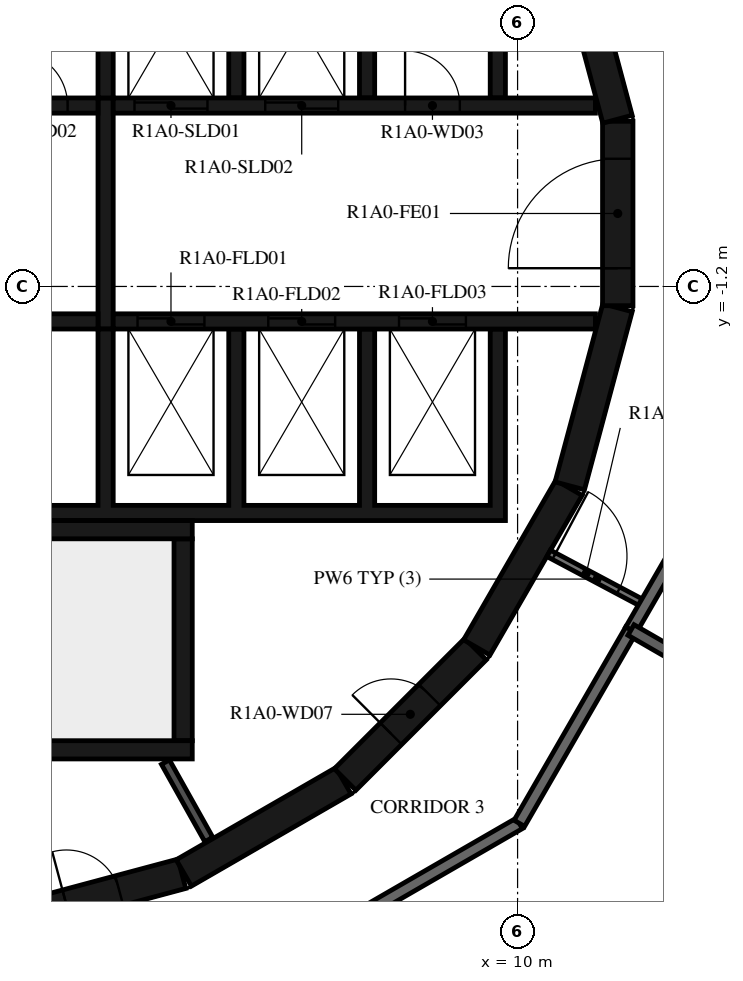
"""IFC4 building model, lengths in metres.
Left out: names, types, materials, properties, quantities, classifications, styles, units other than length and angle.
Written with IfcOpenShell. Run it as: python <this file> out.ifc"""

import sys

from ifc_helpers import new_model, si_unit, direction, frame, frame_2d, origin, place, context, subcontext, project, spatial, polyline, rectangle, outline, extrude, element, fill, save


model = new_model("IFC4")
c1 = context("Model", 3, precision=1e-05, world=origin(), true_north=direction((0.0, 1.0)))
c2 = subcontext(c1, "Body", "Model", "MODEL_VIEW")
j1 = project(units=[si_unit("LENGTHUNIT", "METRE"), si_unit("PLANEANGLEUNIT", "RADIAN")], contexts=[c1])
p1 = place(None, origin())
s1 = spatial("IfcSite", under=j1, at=p1, CompositionType="ELEMENT")
p2 = place(p1, origin())
s2 = spatial("IfcBuilding", under=s1, at=p2, CompositionType="ELEMENT")
p3 = place(p2, frame((0.0, 0.0, 38.4)))
s3 = spatial("IfcBuildingStorey", under=s2, at=p3, CompositionType="ELEMENT", Elevation=38.4)
p4 = place(p3, frame((1.55, -11.643, 0.0), z_axis=(0.0, 0.0, 1.0), x_axis=(0.965948410781, 0.258734743916, 0.0)))
e1 = element("IfcWall", 1, at=p4, inside=s3, PredefinedType="SHEAR", context=c2, shape_type="SweptSolid", body=[
    extrude(rectangle(XDim=3.033, YDim=0.5, at=frame_2d((1.516, 0.0))), origin(), (0.0, 0.0, 1.0), 3.12),
])
p5 = place(p4, frame((1.066, 0.0, 0.0)))
e2 = element("IfcOpeningElement", 2, at=p5, cuts=e1, PredefinedType="OPENING", context=c2, shape_type="SweptSolid", body=[
    extrude(rectangle(XDim=0.9, YDim=2.1, at=frame_2d((0.45, 1.05))), frame((0.0, 0.26, 0.0), z_axis=(0.0, -1.0, 0.0), x_axis=(1.0, 0.0, 0.0)), (0.0, 0.0, 1.0), 0.52),
])
p6 = place(p3, frame((4.51, -10.845, 0.0), z_axis=(0.0, 0.0, 1.0), x_axis=(0.865975092491, 0.500087131594, 0.0)))
e3 = element("IfcWall", 3, at=p6, inside=s3, PredefinedType="SHEAR", context=c2, shape_type="SweptSolid", body=[
    extrude(rectangle(XDim=3.033, YDim=0.5, at=frame_2d((1.516, 0.0))), origin(), (0.0, 0.0, 1.0), 3.12),
])
p7 = place(p3, frame((7.164, -9.308, 0.0), z_axis=(0.0, 0.0, 1.0), x_axis=(0.707106781187, 0.707106781187, 0.0)))
e4 = element("IfcWall", 4, at=p7, inside=s3, PredefinedType="SHEAR", context=c2, shape_type="SweptSolid", body=[
    extrude(rectangle(XDim=3.032, YDim=0.5, at=frame_2d((1.516, 0.0))), origin(), (0.0, 0.0, 1.0), 3.12),
])
p8 = place(p7, frame((1.066, 0.0, 0.0)))
e5 = element("IfcOpeningElement", 5, at=p8, cuts=e4, PredefinedType="OPENING", context=c2, shape_type="SweptSolid", body=[
    extrude(rectangle(XDim=0.9, YDim=2.1, at=frame_2d((0.45, 1.05))), frame((0.0, 0.26, 0.0), z_axis=(0.0, -1.0, 0.0), x_axis=(1.0, 0.0, 0.0)), (0.0, 0.0, 1.0), 0.52),
])
for number, where, z_axis, x_axis in (
    (6, (9.329, -7.137, 0.0), (0.0, 0.0, 1.0), (0.5, 0.866, 0.0)),
    (7, (10.858, -4.479, 0.0), (0.0, 0.0, 1.0), (0.259, 0.966, 0.0)),
):
    element("IfcWall", number, at=place(p3, frame(where, z_axis=z_axis, x_axis=x_axis)), inside=s3, PredefinedType="SHEAR", context=c2, shape_type="SweptSolid", body=[
        extrude(rectangle(XDim=3.033, YDim=0.5, at=frame_2d((1.516, 0.0))), origin(), (0.0, 0.0, 1.0), 3.12),
    ])
p9 = place(p3, frame((11.647, -1.516, 0.0), z_axis=(0.0, 0.0, 1.0), x_axis=(0.0, 1.0, 0.0)))
e8 = element("IfcWall", 8, at=p9, inside=s3, PredefinedType="SHEAR", context=c2, shape_type="SweptSolid", body=[
    extrude(rectangle(XDim=3.033, YDim=0.5, at=frame_2d((1.516, 0.0))), origin(), (0.0, 0.0, 1.0), 3.12),
])
p10 = place(p9, frame((0.616, 0.0, 0.0)))
e9 = element("IfcOpeningElement", 9, at=p10, cuts=e8, PredefinedType="OPENING", context=c2, shape_type="SweptSolid", body=[
    extrude(rectangle(XDim=1.8, YDim=2.1, at=frame_2d((0.9, 1.05))), frame((0.0, 0.26, 0.0), z_axis=(0.0, -1.0, 0.0), x_axis=(1.0, 0.0, 0.0)), (0.0, 0.0, 1.0), 0.52),
])
p11 = place(p3, frame((11.643, 1.55, 0.0), z_axis=(0.0, 0.0, 1.0), x_axis=(-0.258734743916, 0.965948410781, 0.0)))
e10 = element("IfcWall", 10, at=p11, inside=s3, PredefinedType="SHEAR", context=c2, shape_type="SweptSolid", body=[
    extrude(rectangle(XDim=3.033, YDim=0.5, at=frame_2d((1.516, 0.0))), origin(), (0.0, 0.0, 1.0), 3.12),
])
p12 = place(p3, frame((-2.4, -5.2, 0.0), z_axis=(0.0, 0.0, 1.0), x_axis=(1.0, 0.0, 0.0)))
e11 = element("IfcWall", 11, at=p12, inside=s3, PredefinedType="SHEAR", context=c2, shape_type="SweptSolid", body=[
    extrude(rectangle(XDim=7.05, YDim=0.3, at=frame_2d((3.525, 0.0))), origin(), (0.0, 0.0, 1.0), 3.12),
])
p13 = place(p3, frame((4.5, -8.67, 0.0), z_axis=(0.0, 0.0, 1.0), x_axis=(0.0, 1.0, 0.0)))
e12 = element("IfcWall", 12, at=p13, inside=s3, PredefinedType="SHEAR", context=c2, shape_type="SweptSolid", body=[
    extrude(rectangle(XDim=3.32, YDim=0.3, at=frame_2d((1.66, 0.0))), origin(), (0.0, 0.0, 1.0), 3.12),
])
p14 = place(p3, frame((0.1, -8.82, 0.0), z_axis=(0.0, 0.0, 1.0), x_axis=(1.0, 0.0, 0.0)))
e13 = element("IfcWall", 13, at=p14, inside=s3, PredefinedType="SHEAR", context=c2, shape_type="SweptSolid", body=[
    extrude(rectangle(XDim=4.55, YDim=0.3, at=frame_2d((2.275, 0.0))), origin(), (0.0, 0.0, 1.0), 3.12),
])
p15 = place(p3, origin())
e14 = element("IfcWall", 14, at=p15, inside=s3, PredefinedType="SHEAR", context=c2, shape_type="SweptSolid", body=[
    extrude(outline(polyline([(-9.55, 4.8), (-7.65, 4.8), (-7.65, 1.9), (-7.4, 1.9), (-7.4, 4.8), (-5.5, 4.8), (-5.5, 1.9), (-5.25, 1.9), (-5.25, 4.8), (-3.35, 4.8), (-3.35, 1.9), (-3.1, 1.9), (-3.1, 4.8), (-1.2, 4.8), (-1.2, 1.9), (-0.95, 1.9), (-0.95, 4.8), (0.95, 4.8), (0.95, 1.9), (1.2, 1.9), (1.2, 4.8), (3.1, 4.8), (3.1, 1.9), (3.35, 1.9), (3.35, 4.8), (5.25, 4.8), (5.25, 1.9), (5.5, 1.9), (5.5, 4.8), (7.4, 4.8), (7.4, 1.9), (7.65, 1.9), (7.65, 4.8), (9.55, 4.8), (9.55, 1.9), (9.8, 1.9), (9.8, 4.8), (9.8, 5.05), (-9.8, 5.05), (-9.8, 4.8), (-9.8, 1.9), (-9.55, 1.9), (-9.55, 4.8)])), origin(), (0.0, 0.0, 1.0), 3.12),
])
p16 = place(p3, origin())
e15 = element("IfcWall", 15, at=p16, inside=s3, PredefinedType="SHEAR", context=c2, shape_type="SweptSolid", body=[
    extrude(outline(polyline([(9.8, -5.05), (9.8, -4.8), (9.8, -1.9), (9.55, -1.9), (9.55, -4.8), (7.65, -4.8), (7.65, -1.9), (7.4, -1.9), (7.4, -4.8), (5.5, -4.8), (5.5, -1.9), (5.25, -1.9), (5.25, -4.8), (3.35, -4.8), (3.35, -1.9), (3.1, -1.9), (3.1, -4.8), (-5.25, -4.8), (-5.25, -1.9), (-5.5, -1.9), (-5.5, -4.8), (-7.4, -4.8), (-7.4, -1.9), (-7.65, -1.9), (-7.65, -4.8), (-9.55, -4.8), (-9.55, -1.9), (-9.8, -1.9), (-9.8, -4.8), (-9.8, -5.05), (9.8, -5.05)])), origin(), (0.0, 0.0, 1.0), 3.12),
])
p17 = place(p3, frame((-11.28, 1.775, 0.0), z_axis=(0.0, 0.0, 1.0), x_axis=(1.0, 0.0, 0.0)))
e16 = element("IfcWall", 16, at=p17, inside=s3, PredefinedType="SHEAR", context=c2, shape_type="SweptSolid", body=[
    extrude(rectangle(XDim=14.38, YDim=0.25, at=frame_2d((7.19, 0.0))), origin(), (0.0, 0.0, 1.0), 3.12),
])
p18 = place(p17, frame((2.13, 0.0, 0.0)))
e17 = element("IfcOpeningElement", 17, at=p18, cuts=e16, PredefinedType="OPENING", context=c2, shape_type="SweptSolid", body=[
    extrude(rectangle(XDim=1.1, YDim=2.1, at=frame_2d((0.55, 1.05))), frame((0.0, 0.135, 0.0), z_axis=(0.0, -1.0, 0.0), x_axis=(1.0, 0.0, 0.0)), (0.0, 0.0, 1.0), 0.27),
])
p19 = place(p17, frame((4.28, 0.0, 0.0)))
e18 = element("IfcOpeningElement", 18, at=p19, cuts=e16, PredefinedType="OPENING", context=c2, shape_type="SweptSolid", body=[
    extrude(rectangle(XDim=1.1, YDim=2.1, at=frame_2d((0.55, 1.05))), frame((0.0, 0.135, 0.0), z_axis=(0.0, -1.0, 0.0), x_axis=(1.0, 0.0, 0.0)), (0.0, 0.0, 1.0), 0.27),
])
p20 = place(p17, frame((6.43, 0.0, 0.0)))
e19 = element("IfcOpeningElement", 19, at=p20, cuts=e16, PredefinedType="OPENING", context=c2, shape_type="SweptSolid", body=[
    extrude(rectangle(XDim=1.1, YDim=2.1, at=frame_2d((0.55, 1.05))), frame((0.0, 0.135, 0.0), z_axis=(0.0, -1.0, 0.0), x_axis=(1.0, 0.0, 0.0)), (0.0, 0.0, 1.0), 0.27),
])
p21 = place(p17, frame((8.58, 0.0, 0.0)))
e20 = element("IfcOpeningElement", 20, at=p21, cuts=e16, PredefinedType="OPENING", context=c2, shape_type="SweptSolid", body=[
    extrude(rectangle(XDim=1.1, YDim=2.1, at=frame_2d((0.55, 1.05))), frame((0.0, 0.135, 0.0), z_axis=(0.0, -1.0, 0.0), x_axis=(1.0, 0.0, 0.0)), (0.0, 0.0, 1.0), 0.27),
])
p22 = place(p17, frame((10.83, 0.0, 0.0)))
e21 = element("IfcOpeningElement", 21, at=p22, cuts=e16, PredefinedType="OPENING", context=c2, shape_type="SweptSolid", body=[
    extrude(rectangle(XDim=0.9, YDim=2.1, at=frame_2d((0.45, 1.05))), frame((0.0, 0.135, 0.0), z_axis=(0.0, -1.0, 0.0), x_axis=(1.0, 0.0, 0.0)), (0.0, 0.0, 1.0), 0.27),
])
p23 = place(p17, frame((12.98, 0.0, 0.0)))
e22 = element("IfcOpeningElement", 22, at=p23, cuts=e16, PredefinedType="OPENING", context=c2, shape_type="SweptSolid", body=[
    extrude(rectangle(XDim=0.9, YDim=2.1, at=frame_2d((0.45, 1.05))), frame((0.0, 0.135, 0.0), z_axis=(0.0, -1.0, 0.0), x_axis=(1.0, 0.0, 0.0)), (0.0, 0.0, 1.0), 0.27),
])
p24 = place(p3, frame((3.35, 1.775, 0.0), z_axis=(0.0, 0.0, 1.0), x_axis=(1.0, 0.0, 0.0)))
e23 = element("IfcWall", 23, at=p24, inside=s3, PredefinedType="SHEAR", context=c2, shape_type="SweptSolid", body=[
    extrude(rectangle(XDim=7.93, YDim=0.25, at=frame_2d((3.965, 0.0))), origin(), (0.0, 0.0, 1.0), 3.12),
])
p25 = place(p24, frame((0.35, 0.0, 0.0)))
e24 = element("IfcOpeningElement", 24, at=p25, cuts=e23, PredefinedType="OPENING", context=c2, shape_type="SweptSolid", body=[
    extrude(rectangle(XDim=1.2, YDim=2.4, at=frame_2d((0.6, 1.2))), frame((0.0, 0.135, 0.0), z_axis=(0.0, -1.0, 0.0), x_axis=(1.0, 0.0, 0.0)), (0.0, 0.0, 1.0), 0.27),
])
p26 = place(p24, frame((2.5, 0.0, 0.0)))
e25 = element("IfcOpeningElement", 25, at=p26, cuts=e23, PredefinedType="OPENING", context=c2, shape_type="SweptSolid", body=[
    extrude(rectangle(XDim=1.2, YDim=2.4, at=frame_2d((0.6, 1.2))), frame((0.0, 0.135, 0.0), z_axis=(0.0, -1.0, 0.0), x_axis=(1.0, 0.0, 0.0)), (0.0, 0.0, 1.0), 0.27),
])
p27 = place(p24, frame((4.8, 0.0, 0.0)))
e26 = element("IfcOpeningElement", 26, at=p27, cuts=e23, PredefinedType="OPENING", context=c2, shape_type="SweptSolid", body=[
    extrude(rectangle(XDim=0.9, YDim=2.1, at=frame_2d((0.45, 1.05))), frame((0.0, 0.135, 0.0), z_axis=(0.0, -1.0, 0.0), x_axis=(1.0, 0.0, 0.0)), (0.0, 0.0, 1.0), 0.27),
])
p28 = place(p3, frame((-11.28, -1.775, 0.0), z_axis=(0.0, 0.0, 1.0), x_axis=(1.0, 0.0, 0.0)))
e27 = element("IfcWall", 27, at=p28, inside=s3, PredefinedType="SHEAR", context=c2, shape_type="SweptSolid", body=[
    extrude(rectangle(XDim=14.38, YDim=0.25, at=frame_2d((7.19, 0.0))), origin(), (0.0, 0.0, 1.0), 3.12),
])
p29 = place(p28, frame((9.755, 0.0, 0.0)))
e28 = element("IfcOpeningElement", 28, at=p29, cuts=e27, PredefinedType="OPENING", context=c2, shape_type="SweptSolid", body=[
    extrude(rectangle(XDim=0.9, YDim=2.1, at=frame_2d((0.45, 1.05))), frame((0.0, 0.135, 0.0), z_axis=(0.0, -1.0, 0.0), x_axis=(1.0, 0.0, 0.0)), (0.0, 0.0, 1.0), 0.27),
])
p30 = place(p3, frame((3.35, -1.775, 0.0), z_axis=(0.0, 0.0, 1.0), x_axis=(1.0, 0.0, 0.0)))
e29 = element("IfcWall", 29, at=p30, inside=s3, PredefinedType="SHEAR", context=c2, shape_type="SweptSolid", body=[
    extrude(rectangle(XDim=7.93, YDim=0.25, at=frame_2d((3.965, 0.0))), origin(), (0.0, 0.0, 1.0), 3.12),
])
p31 = place(p30, frame((0.4, 0.0, 0.0)))
e30 = element("IfcOpeningElement", 30, at=p31, cuts=e29, PredefinedType="OPENING", context=c2, shape_type="SweptSolid", body=[
    extrude(rectangle(XDim=1.1, YDim=2.4, at=frame_2d((0.55, 1.2))), frame((0.0, 0.135, 0.0), z_axis=(0.0, -1.0, 0.0), x_axis=(1.0, 0.0, 0.0)), (0.0, 0.0, 1.0), 0.27),
])
p32 = place(p30, frame((2.55, 0.0, 0.0)))
e31 = element("IfcOpeningElement", 31, at=p32, cuts=e29, PredefinedType="OPENING", context=c2, shape_type="SweptSolid", body=[
    extrude(rectangle(XDim=1.1, YDim=2.4, at=frame_2d((0.55, 1.2))), frame((0.0, 0.135, 0.0), z_axis=(0.0, -1.0, 0.0), x_axis=(1.0, 0.0, 0.0)), (0.0, 0.0, 1.0), 0.27),
])
p33 = place(p30, frame((4.7, 0.0, 0.0)))
e32 = element("IfcOpeningElement", 32, at=p33, cuts=e29, PredefinedType="OPENING", context=c2, shape_type="SweptSolid", body=[
    extrude(rectangle(XDim=1.1, YDim=2.4, at=frame_2d((0.55, 1.2))), frame((0.0, 0.135, 0.0), z_axis=(0.0, -1.0, 0.0), x_axis=(1.0, 0.0, 0.0)), (0.0, 0.0, 1.0), 0.27),
])
p34 = place(p3, frame((3.225, -1.9, 0.0), z_axis=(0.0, 0.0, 1.0), x_axis=(0.0, 1.0, 0.0)))
e33 = element("IfcWall", 33, at=p34, inside=s3, PredefinedType="SHEAR", context=c2, shape_type="SweptSolid", body=[
    extrude(rectangle(XDim=3.8, YDim=0.25, at=frame_2d((1.9, 0.0))), origin(), (0.0, 0.0, 1.0), 3.12),
])
p35 = place(p3, frame((4.922, -10.296, 0.0), z_axis=(0.0, 0.0, 1.0), x_axis=(-0.48860846254, 0.872503163509, 0.0)))
e34 = element("IfcWall", 34, at=p35, inside=s3, PredefinedType="PARTITIONING", context=c2, shape_type="SweptSolid", body=[
    extrude(rectangle(XDim=1.459, YDim=0.15, at=frame_2d((0.73, 0.0))), origin(), (0.0, 0.0, 1.0), 3.12),
])
p36 = place(p3, frame((10.511, -5.589, 0.0), z_axis=(0.0, 0.0, 1.0), x_axis=(0.88294043061, -0.469485032769, 0.0)))
e35 = element("IfcWall", 35, at=p36, inside=s3, PredefinedType="PARTITIONING", context=c2, shape_type="SweptSolid", body=[
    extrude(rectangle(XDim=1.804, YDim=0.12, at=frame_2d((0.902, 0.0))), origin(), (0.0, 0.0, 1.0), 3.12),
])
p37 = place(p36, frame((0.1, 0.0, 0.0)))
e36 = element("IfcOpeningElement", 36, at=p37, cuts=e35, PredefinedType="OPENING", context=c2, shape_type="SweptSolid", body=[
    extrude(rectangle(XDim=1.2, YDim=2.1, at=frame_2d((0.6, 1.05))), frame((0.0, 0.07, 0.0), z_axis=(0.0, -1.0, 0.0), x_axis=(1.0, 0.0, 0.0)), (0.0, 0.0, 1.0), 0.14),
])
p38 = place(p3, frame((11.865, -6.849, 0.0), z_axis=(0.0, 0.0, 1.0), x_axis=(0.500002704028, 0.866023842607, 0.0)))
e37 = element("IfcWall", 37, at=p38, inside=s3, PredefinedType="STANDARD", context=c2, shape_type="SweptSolid", body=[
    extrude(rectangle(XDim=3.67, YDim=0.2, at=frame_2d((1.835, 0.0))), origin(), (0.0, 0.0, 1.0), 3.12),
])
p39 = place(p3, frame((3.671, -13.7, 0.0), z_axis=(0.0, 0.0, 1.0), x_axis=(0.866024439905, 0.500001669485, 0.0)))
e38 = element("IfcWall", 38, at=p39, inside=s3, PredefinedType="STANDARD", context=c2, shape_type="SweptSolid", body=[
    extrude(rectangle(XDim=7.342, YDim=0.2, at=frame_2d((3.671, 0.0))), origin(), (0.0, 0.0, 1.0), 3.12),
])
p40 = place(p3, frame((10.029, -10.029, 0.0), z_axis=(0.0, 0.0, 1.0), x_axis=(0.50001606911, 0.866016126081, 0.0)))
e39 = element("IfcWall", 39, at=p40, inside=s3, PredefinedType="STANDARD", context=c2, shape_type="SweptSolid", body=[
    extrude(rectangle(XDim=3.671, YDim=0.2, at=frame_2d((1.835, 0.0))), origin(), (0.0, 0.0, 1.0), 3.12),
])
p41 = place(p3, frame((18.694, -10.793, 0.0), z_axis=(0.0, 0.0, 1.0), x_axis=(-0.865964895271, 0.500104789178, 0.0)))
e40 = element("IfcWall", 40, at=p41, inside=s3, PredefinedType="STANDARD", context=c2, shape_type="SweptSolid", body=[
    extrude(rectangle(XDim=7.885, YDim=0.2, at=frame_2d((3.943, 0.0))), origin(), (0.0, 0.0, 1.0), 3.12),
])
p42 = place(p10, origin())
e41 = element("IfcDoor", 41, at=p42, inside=s3, OperationType="DOUBLE_DOOR_SINGLE_SWING", PredefinedType="DOOR", context=c2, shape_type="SweptSolid", body=[
    extrude(rectangle(XDim=1.8, YDim=2.1, at=frame_2d((0.9, 1.05))), frame((0.0, 0.025, 0.0), z_axis=(0.0, -1.0, 0.0), x_axis=(1.0, 0.0, 0.0)), (0.0, 0.0, 1.0), 0.05),
])
fill(e9, e41)
p43 = place(p25, origin())
e42 = element("IfcDoor", 42, at=p43, inside=s3, OperationType="DOUBLE_DOOR_SLIDING", PredefinedType="DOOR", context=c2, shape_type="SweptSolid", body=[
    extrude(rectangle(XDim=1.2, YDim=2.4, at=frame_2d((0.6, 1.2))), frame((0.0, 0.025, 0.0), z_axis=(0.0, -1.0, 0.0), x_axis=(1.0, 0.0, 0.0)), (0.0, 0.0, 1.0), 0.05),
])
fill(e24, e42)
p44 = place(p26, origin())
e43 = element("IfcDoor", 43, at=p44, inside=s3, OperationType="DOUBLE_DOOR_SLIDING", PredefinedType="DOOR", context=c2, shape_type="SweptSolid", body=[
    extrude(rectangle(XDim=1.2, YDim=2.4, at=frame_2d((0.6, 1.2))), frame((0.0, 0.025, 0.0), z_axis=(0.0, -1.0, 0.0), x_axis=(1.0, 0.0, 0.0)), (0.0, 0.0, 1.0), 0.05),
])
fill(e25, e43)
p45 = place(p31, origin())
e44 = element("IfcDoor", 44, at=p45, inside=s3, OperationType="DOUBLE_DOOR_SLIDING", PredefinedType="DOOR", context=c2, shape_type="SweptSolid", body=[
    extrude(rectangle(XDim=1.1, YDim=2.4, at=frame_2d((0.55, 1.2))), frame((0.0, 0.025, 0.0), z_axis=(0.0, -1.0, 0.0), x_axis=(1.0, 0.0, 0.0)), (0.0, 0.0, 1.0), 0.05),
])
fill(e30, e44)
p46 = place(p32, origin())
e45 = element("IfcDoor", 45, at=p46, inside=s3, OperationType="DOUBLE_DOOR_SLIDING", PredefinedType="DOOR", context=c2, shape_type="SweptSolid", body=[
    extrude(rectangle(XDim=1.1, YDim=2.4, at=frame_2d((0.55, 1.2))), frame((0.0, 0.025, 0.0), z_axis=(0.0, -1.0, 0.0), x_axis=(1.0, 0.0, 0.0)), (0.0, 0.0, 1.0), 0.05),
])
fill(e31, e45)
p47 = place(p33, origin())
e46 = element("IfcDoor", 46, at=p47, inside=s3, OperationType="DOUBLE_DOOR_SLIDING", PredefinedType="DOOR", context=c2, shape_type="SweptSolid", body=[
    extrude(rectangle(XDim=1.1, YDim=2.4, at=frame_2d((0.55, 1.2))), frame((0.0, 0.025, 0.0), z_axis=(0.0, -1.0, 0.0), x_axis=(1.0, 0.0, 0.0)), (0.0, 0.0, 1.0), 0.05),
])
fill(e32, e46)
p48 = place(p23, origin())
e47 = element("IfcDoor", 47, at=p48, inside=s3, OperationType="SINGLE_SWING_LEFT", PredefinedType="DOOR", context=c2, shape_type="SweptSolid", body=[
    extrude(rectangle(XDim=0.9, YDim=2.1, at=frame_2d((0.45, 1.05))), frame((0.0, 0.025, 0.0), z_axis=(0.0, -1.0, 0.0), x_axis=(1.0, 0.0, 0.0)), (0.0, 0.0, 1.0), 0.05),
])
fill(e22, e47)
p49 = place(p27, origin())
e48 = element("IfcDoor", 48, at=p49, inside=s3, OperationType="SINGLE_SWING_RIGHT", PredefinedType="DOOR", context=c2, shape_type="SweptSolid", body=[
    extrude(rectangle(XDim=0.9, YDim=2.1, at=frame_2d((0.45, 1.05))), frame((0.0, 0.025, 0.0), z_axis=(0.0, -1.0, 0.0), x_axis=(1.0, 0.0, 0.0)), (0.0, 0.0, 1.0), 0.05),
])
fill(e26, e48)
p50 = place(p8, origin())
e49 = element("IfcDoor", 49, at=p50, inside=s3, OperationType="SINGLE_SWING_RIGHT", PredefinedType="DOOR", context=c2, shape_type="SweptSolid", body=[
    extrude(rectangle(XDim=0.9, YDim=2.1, at=frame_2d((0.45, 1.05))), frame((0.0, 0.025, 0.0), z_axis=(0.0, -1.0, 0.0), x_axis=(1.0, 0.0, 0.0)), (0.0, 0.0, 1.0), 0.05),
])
fill(e5, e49)
p51 = place(p5, origin())
e50 = element("IfcDoor", 50, at=p51, inside=s3, OperationType="SINGLE_SWING_LEFT", PredefinedType="DOOR", context=c2, shape_type="SweptSolid", body=[
    extrude(rectangle(XDim=0.9, YDim=2.1, at=frame_2d((0.45, 1.05))), frame((0.0, 0.025, 0.0), z_axis=(0.0, -1.0, 0.0), x_axis=(1.0, 0.0, 0.0)), (0.0, 0.0, 1.0), 0.05),
])
fill(e2, e50)
p52 = place(p37, origin())
e51 = element("IfcDoor", 51, at=p52, inside=s3, OperationType="DOUBLE_DOOR_SINGLE_SWING", PredefinedType="DOOR", context=c2, shape_type="SweptSolid", body=[
    extrude(rectangle(XDim=1.2, YDim=2.1, at=frame_2d((0.6, 1.05))), frame((0.0, 0.025, 0.0), z_axis=(0.0, -1.0, 0.0), x_axis=(1.0, 0.0, 0.0)), (0.0, 0.0, 1.0), 0.05),
])
fill(e36, e51)
save(model, sys.argv[1])
